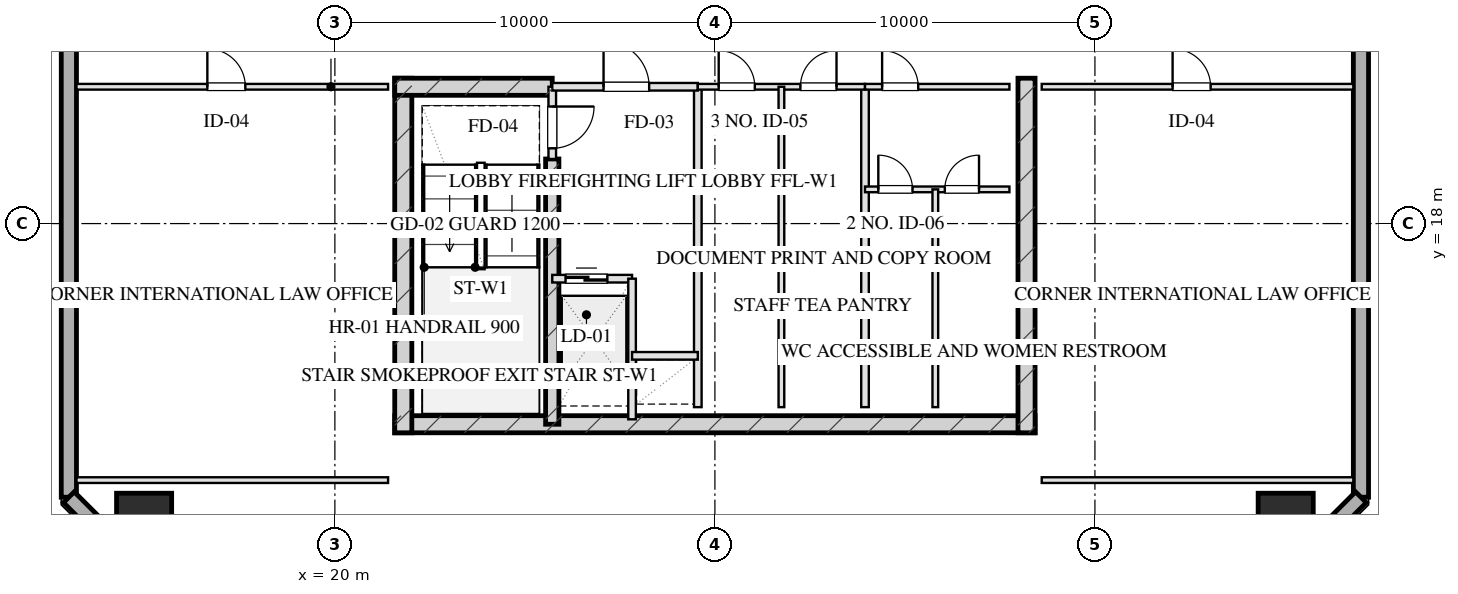
"""IFC4 building model, lengths in metres.
Left out: names, types, materials, properties, quantities, classifications, styles, units other than length and angle.
Written with IfcOpenShell. Run it as: python <this file> out.ifc"""

import sys

from ifc_helpers import new_model, si_unit, direction, frame, frame_2d, origin, origin_2d, place, context, subcontext, project, spatial, rectangle, hollow_rectangle, extrude, element, fill, save


model = new_model("IFC4")
c1 = context("Model", 3, precision=1e-05, world=origin(), true_north=direction((0.0, 1.0)))
c2 = subcontext(c1, "Body", "Model", "MODEL_VIEW")
j1 = project(units=[si_unit("LENGTHUNIT", "METRE"), si_unit("PLANEANGLEUNIT", "RADIAN")], contexts=[c1])
p1 = place(None, origin())
s1 = spatial("IfcSite", under=j1, at=p1, CompositionType="ELEMENT")
p2 = place(p1, origin())
s2 = spatial("IfcBuilding", under=s1, at=p2, CompositionType="ELEMENT")
p3 = place(p2, frame((0.0, 0.0, 195.5)))
s3 = spatial("IfcBuildingStorey", under=s2, at=p3, CompositionType="ELEMENT", Elevation=195.5)
p4 = place(p3, frame((21.575, 12.72, 0.0), z_axis=(0.0, 0.0, 1.0), x_axis=(1.0, 0.0, 0.0)))
e1 = element("IfcWall", 1, at=p4, inside=s3, PredefinedType="SHEAR", context=c2, shape_type="SweptSolid", body=[
    extrude(rectangle(XDim=16.85, YDim=0.45, at=frame_2d((8.425, 0.0))), origin(), (0.0, 0.0, 1.0), 3.45),
])
for number, where, z_axis, x_axis in (
    (2, (21.8, 21.825, 0.0), (0.0, 0.0, 1.0), (0.0, -1.0, 0.0)),
    (3, (38.2, 21.825, 0.0), (0.0, 0.0, 1.0), (0.0, -1.0, 0.0)),
):
    element("IfcWall", number, at=place(p3, frame(where, z_axis=z_axis, x_axis=x_axis)), inside=s3, PredefinedType="SHEAR", context=c2, shape_type="SweptSolid", body=[
        extrude(rectangle(XDim=9.33, YDim=0.45, at=frame_2d((4.665, 0.0))), origin(), (0.0, 0.0, 1.0), 3.45),
    ])
p5 = place(p3, frame((25.72, 19.7, 0.0), z_axis=(0.0, 0.0, 1.0), x_axis=(0.0, -1.0, 0.0)))
e4 = element("IfcWall", 4, at=p5, inside=s3, PredefinedType="SHEAR", context=c2, shape_type="SweptSolid", body=[
    extrude(rectangle(XDim=6.98, YDim=0.35, at=frame_2d((3.49, 0.0))), origin(), (0.0, 0.0, 1.0), 3.45),
])
p6 = place(p3, frame((21.575, 21.6, 0.0), z_axis=(0.0, 0.0, 1.0), x_axis=(1.0, 0.0, 0.0)))
e5 = element("IfcWall", 5, at=p6, inside=s3, PredefinedType="SHEAR", context=c2, shape_type="SweptSolid", body=[
    extrude(rectangle(XDim=4.145, YDim=0.45, at=frame_2d((2.073, 0.0))), origin(), (0.0, 0.0, 1.0), 3.45),
])
for number, where, z_axis, x_axis in (
    (6, (14.98, 10.18, 0.0), (0.0, 0.0, 1.0), (1.0, 0.0, 0.0)),
    (7, (45.02, 10.18, 0.0), (0.0, 0.0, 1.0), (1.0, 0.0, 0.0)),
):
    element("IfcColumn", number, at=place(p3, frame(where, z_axis=z_axis, x_axis=x_axis)), inside=s3, PredefinedType="COLUMN", context=c2, shape_type="SweptSolid", body=[
        extrude(hollow_rectangle(XDim=1.45, YDim=1.45, WallThickness=0.05, at=origin_2d()), origin(), (0.0, 0.0, 1.0), 3.451),
    ])
p7 = place(p3, frame((13.0, 10.8, 0.0), z_axis=(0.0, 0.0, 1.0), x_axis=(0.0, 1.0, 0.0)))
e8 = element("IfcWall", 8, at=p7, inside=s3, PredefinedType="SOLIDWALL", context=c2, shape_type="SweptSolid", body=[
    extrude(rectangle(XDim=46.4, YDim=0.4, at=frame_2d((23.2, 0.0))), origin(), (0.0, 0.0, 1.0), 2.61),
])
p8 = place(p7, frame((24.75, 0.0, 0.75)))
e9 = element("IfcOpeningElement", 9, at=p8, cuts=e8, PredefinedType="OPENING", context=c2, shape_type="SweptSolid", body=[
    extrude(rectangle(XDim=2.1, YDim=1.46, at=frame_2d((1.05, 0.73))), frame((0.0, 0.21, 0.0), z_axis=(0.0, -1.0, 0.0), x_axis=(1.0, 0.0, 0.0)), (0.0, 0.0, 1.0), 0.42),
])
p9 = place(p7, frame((28.55, 0.0, 0.75)))
e10 = element("IfcOpeningElement", 10, at=p9, cuts=e8, PredefinedType="OPENING", context=c2, shape_type="SweptSolid", body=[
    extrude(rectangle(XDim=2.1, YDim=1.46, at=frame_2d((1.05, 0.73))), frame((0.0, 0.21, 0.0), z_axis=(0.0, -1.0, 0.0), x_axis=(1.0, 0.0, 0.0)), (0.0, 0.0, 1.0), 0.42),
])
p10 = place(p7, frame((19.55, 0.0, 0.0)))
e11 = element("IfcOpeningElement", 11, at=p10, cuts=e8, PredefinedType="OPENING", context=c2, shape_type="SweptSolid", body=[
    extrude(rectangle(XDim=1.1, YDim=2.15, at=frame_2d((0.55, 1.075))), frame((0.0, 0.21, 0.0), z_axis=(0.0, -1.0, 0.0), x_axis=(1.0, 0.0, 0.0)), (0.0, 0.0, 1.0), 0.42),
])
p11 = place(p3, frame((47.0, 57.2, 0.0), z_axis=(0.0, 0.0, 1.0), x_axis=(0.0, -1.0, 0.0)))
e12 = element("IfcWall", 12, at=p11, inside=s3, PredefinedType="SOLIDWALL", context=c2, shape_type="SweptSolid", body=[
    extrude(rectangle(XDim=46.4, YDim=0.4, at=frame_2d((23.2, 0.0))), origin(), (0.0, 0.0, 1.0), 2.61),
])
p12 = place(p11, frame((19.55, 0.0, 0.75)))
e13 = element("IfcOpeningElement", 13, at=p12, cuts=e12, PredefinedType="OPENING", context=c2, shape_type="SweptSolid", body=[
    extrude(rectangle(XDim=2.1, YDim=1.46, at=frame_2d((1.05, 0.73))), frame((0.0, 0.21, 0.0), z_axis=(0.0, -1.0, 0.0), x_axis=(1.0, 0.0, 0.0)), (0.0, 0.0, 1.0), 0.42),
])
p13 = place(p11, frame((15.75, 0.0, 0.75)))
e14 = element("IfcOpeningElement", 14, at=p13, cuts=e12, PredefinedType="OPENING", context=c2, shape_type="SweptSolid", body=[
    extrude(rectangle(XDim=2.1, YDim=1.46, at=frame_2d((1.05, 0.73))), frame((0.0, 0.21, 0.0), z_axis=(0.0, -1.0, 0.0), x_axis=(1.0, 0.0, 0.0)), (0.0, 0.0, 1.0), 0.42),
])
p14 = place(p11, frame((27.05, 0.0, 0.0)))
e15 = element("IfcOpeningElement", 15, at=p14, cuts=e12, PredefinedType="OPENING", context=c2, shape_type="SweptSolid", body=[
    extrude(rectangle(XDim=1.1, YDim=2.15, at=frame_2d((0.55, 1.075))), frame((0.0, 0.21, 0.0), z_axis=(0.0, -1.0, 0.0), x_axis=(1.0, 0.0, 0.0)), (0.0, 0.0, 1.0), 0.42),
])
for number, where, z_axis, x_axis in (
    (16, (47.0, 10.8, 0.0), (0.0, 0.0, 1.0), (-0.707, -0.707, 0.0)),
    (17, (15.6, 8.2, 0.0), (0.0, 0.0, 1.0), (-0.707, 0.707, 0.0)),
):
    element("IfcWall", number, at=place(p3, frame(where, z_axis=z_axis, x_axis=x_axis)), inside=s3, PredefinedType="SOLIDWALL", context=c2, shape_type="SweptSolid", body=[
        extrude(rectangle(XDim=3.677, YDim=0.4, at=frame_2d((1.838, 0.0))), origin(), (0.0, 0.0, 1.0), 2.61),
    ])
p15 = place(p3, frame((25.72, 21.6, 0.0), z_axis=(0.0, 0.0, 1.0), x_axis=(0.0, -1.0, 0.0)))
e18 = element("IfcWall", 18, at=p15, inside=s3, PredefinedType="PARTITIONING", context=c2, shape_type="SweptSolid", body=[
    extrude(rectangle(XDim=1.9, YDim=0.2, at=frame_2d((0.95, 0.0))), origin(), (0.0, 0.0, 1.0), 3.175),
])
p16 = place(p15, frame((0.52, 0.0, 0.0)))
e19 = element("IfcOpeningElement", 19, at=p16, cuts=e18, PredefinedType="OPENING", context=c2, shape_type="SweptSolid", body=[
    extrude(rectangle(XDim=1.1, YDim=2.05, at=frame_2d((0.55, 1.025))), frame((0.0, 0.11, 0.0), z_axis=(0.0, -1.0, 0.0), x_axis=(1.0, 0.0, 0.0)), (0.0, 0.0, 1.0), 0.22),
])
p17 = place(p3, frame((29.55, 21.6, 0.0), z_axis=(0.0, 0.0, 1.0), x_axis=(0.0, -1.0, 0.0)))
e20 = element("IfcWall", 20, at=p17, inside=s3, PredefinedType="PARTITIONING", context=c2, shape_type="SweptSolid", body=[
    extrude(rectangle(XDim=8.43, YDim=0.2, at=frame_2d((4.215, 0.0))), origin(), (0.0, 0.0, 1.0), 3.175),
])
p18 = place(p3, frame((25.72, 21.6, 0.0), z_axis=(0.0, 0.0, 1.0), x_axis=(1.0, 0.0, 0.0)))
e21 = element("IfcWall", 21, at=p18, inside=s3, PredefinedType="PARTITIONING", context=c2, shape_type="SweptSolid", body=[
    extrude(rectangle(XDim=3.83, YDim=0.2, at=frame_2d((1.915, 0.0))), origin(), (0.0, 0.0, 1.0), 3.175),
])
p19 = place(p18, frame((1.35, 0.0, 0.0)))
e22 = element("IfcOpeningElement", 22, at=p19, cuts=e21, PredefinedType="OPENING", context=c2, shape_type="SweptSolid", body=[
    extrude(rectangle(XDim=1.2, YDim=2.05, at=frame_2d((0.6, 1.025))), frame((0.0, 0.11, 0.0), z_axis=(0.0, -1.0, 0.0), x_axis=(1.0, 0.0, 0.0)), (0.0, 0.0, 1.0), 0.22),
])
p20 = place(p3, frame((25.72, 16.55, 0.0), z_axis=(0.0, 0.0, 1.0), x_axis=(1.0, 0.0, 0.0)))
e23 = element("IfcWall", 23, at=p20, inside=s3, PredefinedType="PARTITIONING", context=c2, shape_type="SweptSolid", body=[
    extrude(rectangle(XDim=2.1, YDim=0.2, at=frame_2d((1.05, 0.0))), origin(), (0.0, 0.0, 1.0), 3.175),
])
p21 = place(p20, frame((0.35, 0.0, 0.0)))
e24 = element("IfcOpeningElement", 24, at=p21, cuts=e23, PredefinedType="OPENING", context=c2, shape_type="SweptSolid", body=[
    extrude(rectangle(XDim=1.1, YDim=2.05, at=frame_2d((0.55, 1.025))), frame((0.0, 0.11, 0.0), z_axis=(0.0, -1.0, 0.0), x_axis=(1.0, 0.0, 0.0)), (0.0, 0.0, 1.0), 0.22),
])
p22 = place(p3, frame((27.82, 16.55, 0.0), z_axis=(0.0, 0.0, 1.0), x_axis=(0.0, -1.0, 0.0)))
e25 = element("IfcWall", 25, at=p22, inside=s3, PredefinedType="PARTITIONING", context=c2, shape_type="SweptSolid", body=[
    extrude(rectangle(XDim=3.7, YDim=0.2, at=frame_2d((1.85, 0.0))), origin(), (0.0, 0.0, 1.0), 3.175),
])
p23 = place(p3, frame((27.82, 14.52, 0.0), z_axis=(0.0, 0.0, 1.0), x_axis=(1.0, 0.0, 0.0)))
e26 = element("IfcWall", 26, at=p23, inside=s3, PredefinedType="PARTITIONING", context=c2, shape_type="SweptSolid", body=[
    extrude(rectangle(XDim=1.73, YDim=0.2, at=frame_2d((0.865, 0.0))), origin(), (0.0, 0.0, 1.0), 3.175),
])
p24 = place(p3, frame((33.95, 21.6, 0.0), z_axis=(0.0, 0.0, 1.0), x_axis=(0.0, -1.0, 0.0)))
e27 = element("IfcWall", 27, at=p24, inside=s3, PredefinedType="PARTITIONING", context=c2, shape_type="SweptSolid", body=[
    extrude(rectangle(XDim=8.43, YDim=0.2, at=frame_2d((4.215, 0.0))), origin(), (0.0, 0.0, 1.0), 3.175),
])
p25 = place(p3, frame((29.55, 21.6, 0.0), z_axis=(0.0, 0.0, 1.0), x_axis=(1.0, 0.0, 0.0)))
e28 = element("IfcWall", 28, at=p25, inside=s3, PredefinedType="PARTITIONING", context=c2, shape_type="SweptSolid", body=[
    extrude(rectangle(XDim=4.4, YDim=0.15, at=frame_2d((2.2, 0.0))), origin(), (0.0, 0.0, 1.0), 3.175),
])
p26 = place(p25, frame((0.55, 0.0, 0.0)))
e29 = element("IfcOpeningElement", 29, at=p26, cuts=e28, PredefinedType="OPENING", context=c2, shape_type="SweptSolid", body=[
    extrude(rectangle(XDim=0.95, YDim=2.05, at=frame_2d((0.475, 1.025))), frame((0.0, 0.085, 0.0), z_axis=(0.0, -1.0, 0.0), x_axis=(1.0, 0.0, 0.0)), (0.0, 0.0, 1.0), 0.17),
])
p27 = place(p25, frame((2.7, 0.0, 0.0)))
e30 = element("IfcOpeningElement", 30, at=p27, cuts=e28, PredefinedType="OPENING", context=c2, shape_type="SweptSolid", body=[
    extrude(rectangle(XDim=0.95, YDim=2.05, at=frame_2d((0.475, 1.025))), frame((0.0, 0.085, 0.0), z_axis=(0.0, -1.0, 0.0), x_axis=(1.0, 0.0, 0.0)), (0.0, 0.0, 1.0), 0.17),
])
p28 = place(p3, frame((31.75, 21.6, 0.0), z_axis=(0.0, 0.0, 1.0), x_axis=(0.0, -1.0, 0.0)))
e31 = element("IfcWall", 31, at=p28, inside=s3, PredefinedType="PARTITIONING", context=c2, shape_type="SweptSolid", body=[
    extrude(rectangle(XDim=8.43, YDim=0.15, at=frame_2d((4.215, 0.0))), origin(), (0.0, 0.0, 1.0), 3.175),
])
p29 = place(p3, frame((33.95, 21.6, 0.0), z_axis=(0.0, 0.0, 1.0), x_axis=(1.0, 0.0, 0.0)))
e32 = element("IfcWall", 32, at=p29, inside=s3, PredefinedType="PARTITIONING", context=c2, shape_type="SweptSolid", body=[
    extrude(rectangle(XDim=3.8, YDim=0.15, at=frame_2d((1.9, 0.0))), origin(), (0.0, 0.0, 1.0), 3.175),
])
p30 = place(p29, frame((0.45, 0.0, 0.0)))
e33 = element("IfcOpeningElement", 33, at=p30, cuts=e32, PredefinedType="OPENING", context=c2, shape_type="SweptSolid", body=[
    extrude(rectangle(XDim=0.95, YDim=2.05, at=frame_2d((0.475, 1.025))), frame((0.0, 0.085, 0.0), z_axis=(0.0, -1.0, 0.0), x_axis=(1.0, 0.0, 0.0)), (0.0, 0.0, 1.0), 0.17),
])
p31 = place(p3, frame((33.95, 18.9, 0.0), z_axis=(0.0, 0.0, 1.0), x_axis=(1.0, 0.0, 0.0)))
e34 = element("IfcWall", 34, at=p31, inside=s3, PredefinedType="PARTITIONING", context=c2, shape_type="SweptSolid", body=[
    extrude(rectangle(XDim=3.8, YDim=0.15, at=frame_2d((1.9, 0.0))), origin(), (0.0, 0.0, 1.0), 3.175),
])
p32 = place(p31, frame((0.35, 0.0, 0.0)))
e35 = element("IfcOpeningElement", 35, at=p32, cuts=e34, PredefinedType="OPENING", context=c2, shape_type="SweptSolid", body=[
    extrude(rectangle(XDim=0.9, YDim=2.05, at=frame_2d((0.45, 1.025))), frame((0.0, 0.085, 0.0), z_axis=(0.0, -1.0, 0.0), x_axis=(1.0, 0.0, 0.0)), (0.0, 0.0, 1.0), 0.17),
])
p33 = place(p31, frame((2.1, 0.0, 0.0)))
e36 = element("IfcOpeningElement", 36, at=p33, cuts=e34, PredefinedType="OPENING", context=c2, shape_type="SweptSolid", body=[
    extrude(rectangle(XDim=0.9, YDim=2.05, at=frame_2d((0.45, 1.025))), frame((0.0, 0.085, 0.0), z_axis=(0.0, -1.0, 0.0), x_axis=(1.0, 0.0, 0.0)), (0.0, 0.0, 1.0), 0.17),
])
p34 = place(p3, frame((35.8, 18.9, 0.0), z_axis=(0.0, 0.0, 1.0), x_axis=(0.0, -1.0, 0.0)))
e37 = element("IfcWall", 37, at=p34, inside=s3, PredefinedType="PARTITIONING", context=c2, shape_type="SweptSolid", body=[
    extrude(rectangle(XDim=5.73, YDim=0.15, at=frame_2d((2.865, 0.0))), origin(), (0.0, 0.0, 1.0), 3.175),
])
p35 = place(p3, frame((13.2, 11.25, 0.0), z_axis=(0.0, 0.0, 1.0), x_axis=(1.0, 0.0, 0.0)))
e38 = element("IfcWall", 38, at=p35, inside=s3, PredefinedType="PARTITIONING", context=c2, shape_type="SweptSolid", body=[
    extrude(rectangle(XDim=8.2, YDim=0.15, at=frame_2d((4.1, 0.0))), origin(), (0.0, 0.0, 1.0), 3.175),
])
p36 = place(p3, frame((13.2, 21.6, 0.0), z_axis=(0.0, 0.0, 1.0), x_axis=(1.0, 0.0, 0.0)))
e39 = element("IfcWall", 39, at=p36, inside=s3, PredefinedType="PARTITIONING", context=c2, shape_type="SweptSolid", body=[
    extrude(rectangle(XDim=8.2, YDim=0.15, at=frame_2d((4.1, 0.0))), origin(), (0.0, 0.0, 1.0), 3.175),
])
p37 = place(p36, frame((3.444, 0.0, 0.0)))
e40 = element("IfcOpeningElement", 40, at=p37, cuts=e39, PredefinedType="OPENING", context=c2, shape_type="SweptSolid", body=[
    extrude(rectangle(XDim=1.0, YDim=2.05, at=frame_2d((0.5, 1.025))), frame((0.0, 0.085, 0.0), z_axis=(0.0, -1.0, 0.0), x_axis=(1.0, 0.0, 0.0)), (0.0, 0.0, 1.0), 0.17),
])
p38 = place(p3, frame((38.6, 11.25, 0.0), z_axis=(0.0, 0.0, 1.0), x_axis=(1.0, 0.0, 0.0)))
e41 = element("IfcWall", 41, at=p38, inside=s3, PredefinedType="PARTITIONING", context=c2, shape_type="SweptSolid", body=[
    extrude(rectangle(XDim=8.2, YDim=0.15, at=frame_2d((4.1, 0.0))), origin(), (0.0, 0.0, 1.0), 3.175),
])
p39 = place(p3, frame((38.6, 21.6, 0.0), z_axis=(0.0, 0.0, 1.0), x_axis=(1.0, 0.0, 0.0)))
e42 = element("IfcWall", 42, at=p39, inside=s3, PredefinedType="PARTITIONING", context=c2, shape_type="SweptSolid", body=[
    extrude(rectangle(XDim=8.2, YDim=0.15, at=frame_2d((4.1, 0.0))), origin(), (0.0, 0.0, 1.0), 3.175),
])
p40 = place(p39, frame((3.444, 0.0, 0.0)))
e43 = element("IfcOpeningElement", 43, at=p40, cuts=e42, PredefinedType="OPENING", context=c2, shape_type="SweptSolid", body=[
    extrude(rectangle(XDim=1.0, YDim=2.05, at=frame_2d((0.5, 1.025))), frame((0.0, 0.085, 0.0), z_axis=(0.0, -1.0, 0.0), x_axis=(1.0, 0.0, 0.0)), (0.0, 0.0, 1.0), 0.17),
])
p41 = place(p16, origin())
e44 = element("IfcDoor", 44, at=p41, inside=s3, OperationType="SINGLE_SWING_LEFT", PredefinedType="DOOR", context=c2, shape_type="SweptSolid", body=[
    extrude(rectangle(XDim=1.1, YDim=2.05, at=frame_2d((0.55, 1.025))), frame((0.0, 0.025, 0.0), z_axis=(0.0, -1.0, 0.0), x_axis=(1.0, 0.0, 0.0)), (0.0, 0.0, 1.0), 0.05),
])
fill(e19, e44)
p42 = place(p19, origin())
e45 = element("IfcDoor", 45, at=p42, inside=s3, OperationType="SINGLE_SWING_LEFT", PredefinedType="DOOR", context=c2, shape_type="SweptSolid", body=[
    extrude(rectangle(XDim=1.2, YDim=2.05, at=frame_2d((0.6, 1.025))), frame((0.0, 0.025, 0.0), z_axis=(0.0, -1.0, 0.0), x_axis=(1.0, 0.0, 0.0)), (0.0, 0.0, 1.0), 0.05),
])
fill(e22, e45)
p43 = place(p21, origin())
e46 = element("IfcDoor", 46, at=p43, inside=s3, OperationType="DOUBLE_DOOR_SLIDING", PredefinedType="DOOR", context=c2, shape_type="SweptSolid", body=[
    extrude(rectangle(XDim=1.1, YDim=2.05, at=frame_2d((0.55, 1.025))), frame((0.0, 0.025, 0.0), z_axis=(0.0, -1.0, 0.0), x_axis=(1.0, 0.0, 0.0)), (0.0, 0.0, 1.0), 0.05),
])
fill(e24, e46)
p44 = place(p26, origin())
e47 = element("IfcDoor", 47, at=p44, inside=s3, OperationType="SINGLE_SWING_LEFT", PredefinedType="DOOR", context=c2, shape_type="SweptSolid", body=[
    extrude(rectangle(XDim=0.95, YDim=2.05, at=frame_2d((0.475, 1.025))), frame((0.0, 0.025, 0.0), z_axis=(0.0, -1.0, 0.0), x_axis=(1.0, 0.0, 0.0)), (0.0, 0.0, 1.0), 0.05),
])
fill(e29, e47)
p45 = place(p27, origin())
e48 = element("IfcDoor", 48, at=p45, inside=s3, OperationType="SINGLE_SWING_RIGHT", PredefinedType="DOOR", context=c2, shape_type="SweptSolid", body=[
    extrude(rectangle(XDim=0.95, YDim=2.05, at=frame_2d((0.475, 1.025))), frame((0.0, 0.025, 0.0), z_axis=(0.0, -1.0, 0.0), x_axis=(1.0, 0.0, 0.0)), (0.0, 0.0, 1.0), 0.05),
])
fill(e30, e48)
p46 = place(p30, origin())
e49 = element("IfcDoor", 49, at=p46, inside=s3, OperationType="SINGLE_SWING_LEFT", PredefinedType="DOOR", context=c2, shape_type="SweptSolid", body=[
    extrude(rectangle(XDim=0.95, YDim=2.05, at=frame_2d((0.475, 1.025))), frame((0.0, 0.025, 0.0), z_axis=(0.0, -1.0, 0.0), x_axis=(1.0, 0.0, 0.0)), (0.0, 0.0, 1.0), 0.05),
])
fill(e33, e49)
p47 = place(p32, origin())
e50 = element("IfcDoor", 50, at=p47, inside=s3, OperationType="SINGLE_SWING_LEFT", PredefinedType="DOOR", context=c2, shape_type="SweptSolid", body=[
    extrude(rectangle(XDim=0.9, YDim=2.05, at=frame_2d((0.45, 1.025))), frame((0.0, 0.025, 0.0), z_axis=(0.0, -1.0, 0.0), x_axis=(1.0, 0.0, 0.0)), (0.0, 0.0, 1.0), 0.05),
])
fill(e35, e50)
p48 = place(p33, origin())
e51 = element("IfcDoor", 51, at=p48, inside=s3, OperationType="SINGLE_SWING_RIGHT", PredefinedType="DOOR", context=c2, shape_type="SweptSolid", body=[
    extrude(rectangle(XDim=0.9, YDim=2.05, at=frame_2d((0.45, 1.025))), frame((0.0, 0.025, 0.0), z_axis=(0.0, -1.0, 0.0), x_axis=(1.0, 0.0, 0.0)), (0.0, 0.0, 1.0), 0.05),
])
fill(e36, e51)
p49 = place(p37, origin())
e52 = element("IfcDoor", 52, at=p49, inside=s3, OperationType="SINGLE_SWING_LEFT", PredefinedType="DOOR", context=c2, shape_type="SweptSolid", body=[
    extrude(rectangle(XDim=1.0, YDim=2.05, at=frame_2d((0.5, 1.025))), frame((0.0, 0.025, 0.0), z_axis=(0.0, -1.0, 0.0), x_axis=(1.0, 0.0, 0.0)), (0.0, 0.0, 1.0), 0.05),
])
fill(e40, e52)
p50 = place(p40, origin())
e53 = element("IfcDoor", 53, at=p50, inside=s3, OperationType="SINGLE_SWING_LEFT", PredefinedType="DOOR", context=c2, shape_type="SweptSolid", body=[
    extrude(rectangle(XDim=1.0, YDim=2.05, at=frame_2d((0.5, 1.025))), frame((0.0, 0.025, 0.0), z_axis=(0.0, -1.0, 0.0), x_axis=(1.0, 0.0, 0.0)), (0.0, 0.0, 1.0), 0.05),
])
fill(e43, e53)
save(model, sys.argv[1])
